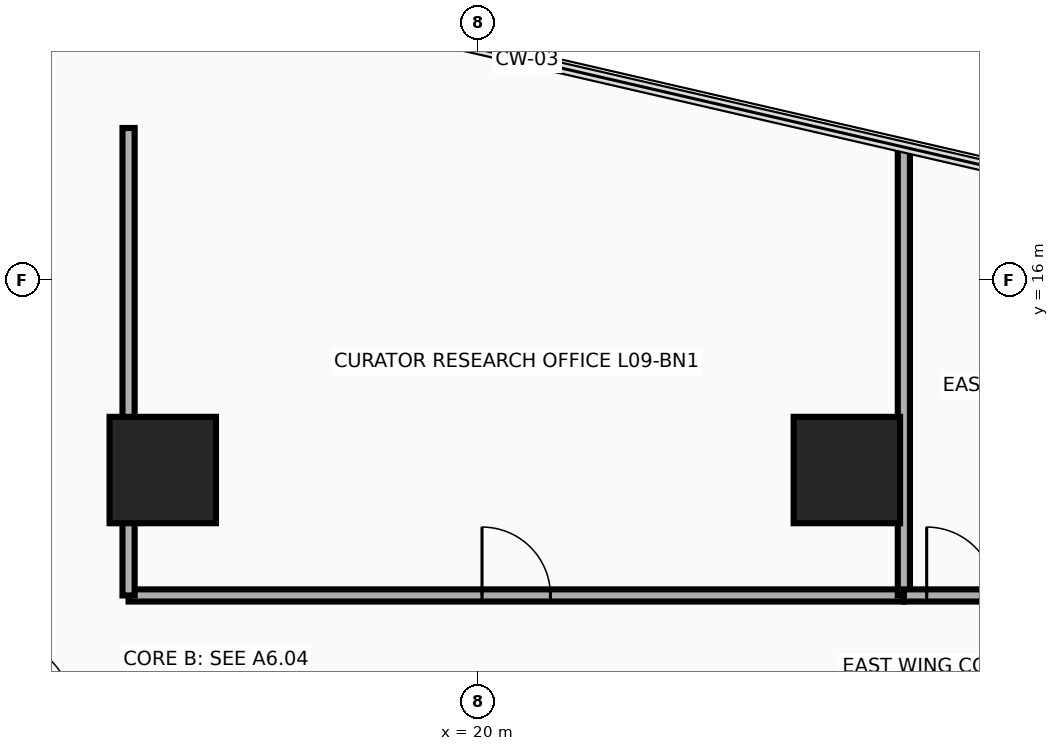
"""IFC4 building model, lengths in metres.
Left out: names, types, materials, properties, quantities, classifications, styles, units other than length and angle.
Written with IfcOpenShell. Run it as: python <this file> out.ifc"""

import sys

from ifc_helpers import new_model, si_unit, direction, frame, frame_2d, origin, origin_2d, place, context, subcontext, project, spatial, rectangle, extrude, source, transform, mapped, element, fill, save


model = new_model("IFC4")
c1 = context("Model", 3, precision=1e-05, world=origin(), true_north=direction((0.0, 1.0)))
c2 = subcontext(c1, "Body", "Model", "MODEL_VIEW")
j1 = project(units=[si_unit("LENGTHUNIT", "METRE"), si_unit("PLANEANGLEUNIT", "RADIAN")], contexts=[c1])
p1 = place(None, origin())
s1 = spatial("IfcSite", under=j1, at=p1, CompositionType="ELEMENT")
p2 = place(p1, origin())
s2 = spatial("IfcBuilding", under=s1, at=p2, CompositionType="ELEMENT")
p3 = place(p2, frame((0.0, 0.0, 40.8)))
s3 = spatial("IfcBuildingStorey", under=s2, at=p3, CompositionType="ELEMENT", Elevation=40.8)
m1 = source(origin(), c2, "Body", "SweptSolid", [
    extrude(rectangle(XDim=1.4, YDim=1.4, at=origin_2d()), origin(), (0.0, 0.0, 1.0), 3.7),
])
for number, where, z_axis, x_axis in (
    (1, (15.85, 13.5, 0.0), (0.0, 0.0, 1.0), (1.0, 0.0, 0.0)),
    (2, (24.85, 13.5, 0.0), (0.0, 0.0, 1.0), (1.0, 0.0, 0.0)),
):
    element("IfcColumn", number, at=place(p3, frame(where, z_axis=z_axis, x_axis=x_axis)), inside=s3, PredefinedType="COLUMN", context=c2, shape_type="MappedRepresentation", body=[
        mapped(m1, transform((0.0, 0.0, 0.0), x_axis=(1.0, 0.0, 0.0), y_axis=(0.0, 1.0, 0.0), z_axis=(0.0, 0.0, 1.0), scale=1.0)),
    ])
p4 = place(p3, frame((15.4, 11.85, 0.0), z_axis=(0.0, 0.0, 1.0), x_axis=(1.0, 0.0, 0.0)))
e3 = element("IfcWall", 3, at=p4, inside=s3, PredefinedType="PARTITIONING", context=c2, shape_type="SweptSolid", body=[
    extrude(rectangle(XDim=10.2, YDim=0.16, at=frame_2d((5.1, 0.0))), origin(), (0.0, 0.0, 1.0), 2.834),
])
p5 = place(p4, frame((4.65, 0.0, 0.0)))
e4 = element("IfcOpeningElement", 4, at=p5, cuts=e3, PredefinedType="OPENING", context=c2, shape_type="SweptSolid", body=[
    extrude(rectangle(XDim=0.9, YDim=2.1, at=frame_2d((0.45, 1.05))), frame((0.0, 0.095, 0.0), z_axis=(0.0, -1.0, 0.0), x_axis=(1.0, 0.0, 0.0)), (0.0, 0.0, 1.0), 0.19),
])
p6 = place(p3, frame((15.4, 11.85, 0.0), z_axis=(0.0, 0.0, 1.0), x_axis=(0.0, 1.0, 0.0)))
e5 = element("IfcWall", 5, at=p6, inside=s3, PredefinedType="PARTITIONING", context=c2, shape_type="SweptSolid", body=[
    extrude(rectangle(XDim=6.15, YDim=0.16, at=frame_2d((3.075, 0.0))), origin(), (0.0, 0.0, 1.0), 2.583),
])
p7 = place(p3, frame((25.6, 11.85, 0.0), z_axis=(0.0, 0.0, 1.0), x_axis=(0.0, 1.0, 0.0)))
e6 = element("IfcWall", 6, at=p7, inside=s3, PredefinedType="PARTITIONING", context=c2, shape_type="SweptSolid", body=[
    extrude(rectangle(XDim=5.898, YDim=0.16, at=frame_2d((2.949, 0.0))), origin(), (0.0, 0.0, 1.0), 2.583),
])
p8 = place(p3, frame((25.6, 11.85, 0.0), z_axis=(0.0, 0.0, 1.0), x_axis=(1.0, 0.0, 0.0)))
e7 = element("IfcWall", 7, at=p8, inside=s3, PredefinedType="PARTITIONING", context=c2, shape_type="SweptSolid", body=[
    extrude(rectangle(XDim=5.79, YDim=0.16, at=frame_2d((2.895, 0.0))), origin(), (0.0, 0.0, 1.0), 2.896),
])
p9 = place(p8, frame((0.3, 0.0, 0.0)))
e8 = element("IfcOpeningElement", 8, at=p9, cuts=e7, PredefinedType="OPENING", context=c2, shape_type="SweptSolid", body=[
    extrude(rectangle(XDim=0.9, YDim=2.1, at=frame_2d((0.45, 1.05))), frame((0.0, 0.095, 0.0), z_axis=(0.0, -1.0, 0.0), x_axis=(1.0, 0.0, 0.0)), (0.0, 0.0, 1.0), 0.19),
])
p10 = place(p5, origin())
e9 = element("IfcDoor", 9, at=p10, inside=s3, OperationType="SINGLE_SWING_RIGHT", PredefinedType="DOOR", context=c2, shape_type="SweptSolid", body=[
    extrude(rectangle(XDim=0.9, YDim=2.1, at=frame_2d((0.45, 1.05))), frame((0.0, 0.025, 0.0), z_axis=(0.0, -1.0, 0.0), x_axis=(1.0, 0.0, 0.0)), (0.0, 0.0, 1.0), 0.05),
])
fill(e4, e9)
p11 = place(p9, origin())
e10 = element("IfcDoor", 10, at=p11, inside=s3, OperationType="SINGLE_SWING_LEFT", PredefinedType="DOOR", context=c2, shape_type="SweptSolid", body=[
    extrude(rectangle(XDim=0.9, YDim=2.1, at=frame_2d((0.45, 1.05))), frame((0.0, 0.025, 0.0), z_axis=(0.0, -1.0, 0.0), x_axis=(1.0, 0.0, 0.0)), (0.0, 0.0, 1.0), 0.05),
])
fill(e8, e10)
save(model, sys.argv[1])
